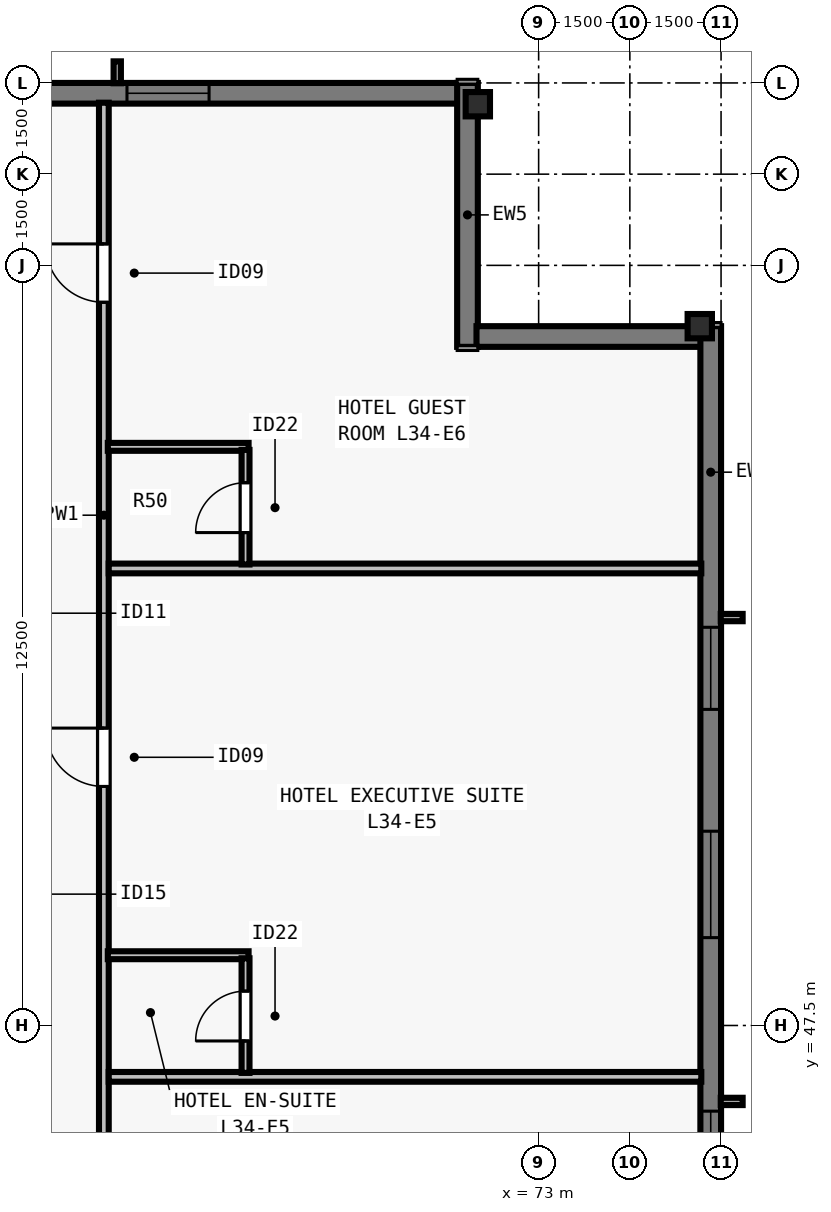
"""IFC4 building model, lengths in metres.
Left out: names, types, materials, properties, quantities, classifications, styles, units other than length and angle.
Written with IfcOpenShell. Run it as: python <this file> out.ifc"""

import sys

from ifc_helpers import new_model, si_unit, direction, frame, frame_2d, origin, origin_2d, place, context, subcontext, project, spatial, rectangle, i_section, extrude, element, fill, save


model = new_model("IFC4")
c1 = context("Model", 3, precision=1e-05, world=origin(), true_north=direction((0.0, 1.0)))
c2 = subcontext(c1, "Body", "Model", "MODEL_VIEW")
j1 = project(units=[si_unit("LENGTHUNIT", "METRE"), si_unit("PLANEANGLEUNIT", "RADIAN")], contexts=[c1])
p1 = place(None, origin())
s1 = spatial("IfcSite", under=j1, at=p1, CompositionType="ELEMENT")
p2 = place(p1, origin())
s2 = spatial("IfcBuilding", under=s1, at=p2, CompositionType="ELEMENT")
p3 = place(p2, frame((0.0, 0.0, 127.0)))
s3 = spatial("IfcBuildingStorey", under=s2, at=p3, CompositionType="ELEMENT", Elevation=127.0)
for number, where, z_axis, x_axis in (
    (1, (75.65, 59.0, 0.0), (0.0, 0.0, 1.0), (0.0, 1.0, 0.0)),
    (2, (72.0, 62.65, 0.0), (0.0, 0.0, 1.0), (1.0, 0.0, 0.0)),
):
    element("IfcColumn", number, at=place(p3, frame(where, z_axis=z_axis, x_axis=x_axis)), inside=s3, PredefinedType="COLUMN", context=c2, shape_type="SweptSolid", body=[
        extrude(i_section(OverallWidth=0.4, OverallDepth=0.4, WebThickness=0.022, FlangeThickness=0.036, at=origin_2d()), origin(), (0.0, 0.0, 1.0), 3.5),
    ])
p4 = place(p3, frame((32.0, 62.83, 0.0), z_axis=(0.0, 0.0, 1.0), x_axis=(1.0, 0.0, 0.0)))
e3 = element("IfcWall", 3, at=p4, inside=s3, PredefinedType="SOLIDWALL", context=c2, shape_type="SweptSolid", body=[
    extrude(rectangle(XDim=39.682, YDim=0.34, at=frame_2d((19.841, 0.0))), origin(), (0.0, 0.0, 1.0), 3.28),
])
p5 = place(p4, frame((4.952, 0.0, 0.8)))
e4 = element("IfcOpeningElement", 4, at=p5, cuts=e3, PredefinedType="OPENING", context=c2, shape_type="SweptSolid", body=[
    extrude(rectangle(XDim=1.35, YDim=1.66, at=frame_2d((0.675, 0.83))), frame((0.0, 0.18, 0.0), z_axis=(0.0, -1.0, 0.0), x_axis=(1.0, 0.0, 0.0)), (0.0, 0.0, 1.0), 0.36),
])
p6 = place(p4, frame((12.059, 0.0, 0.8)))
e5 = element("IfcOpeningElement", 5, at=p6, cuts=e3, PredefinedType="OPENING", context=c2, shape_type="SweptSolid", body=[
    extrude(rectangle(XDim=1.35, YDim=1.66, at=frame_2d((0.675, 0.83))), frame((0.0, 0.18, 0.0), z_axis=(0.0, -1.0, 0.0), x_axis=(1.0, 0.0, 0.0)), (0.0, 0.0, 1.0), 0.36),
])
p7 = place(p4, frame((16.262, 0.0, 0.8)))
e6 = element("IfcOpeningElement", 6, at=p7, cuts=e3, PredefinedType="OPENING", context=c2, shape_type="SweptSolid", body=[
    extrude(rectangle(XDim=1.75, YDim=1.66, at=frame_2d((0.875, 0.83))), frame((0.0, 0.18, 0.0), z_axis=(0.0, -1.0, 0.0), x_axis=(1.0, 0.0, 0.0)), (0.0, 0.0, 1.0), 0.36),
])
p8 = place(p4, frame((19.166, 0.0, 0.8)))
e7 = element("IfcOpeningElement", 7, at=p8, cuts=e3, PredefinedType="OPENING", context=c2, shape_type="SweptSolid", body=[
    extrude(rectangle(XDim=1.35, YDim=1.66, at=frame_2d((0.675, 0.83))), frame((0.0, 0.18, 0.0), z_axis=(0.0, -1.0, 0.0), x_axis=(1.0, 0.0, 0.0)), (0.0, 0.0, 1.0), 0.36),
])
p9 = place(p4, frame((22.07, 0.0, 0.8)))
e8 = element("IfcOpeningElement", 8, at=p9, cuts=e3, PredefinedType="OPENING", context=c2, shape_type="SweptSolid", body=[
    extrude(rectangle(XDim=1.75, YDim=1.66, at=frame_2d((0.875, 0.83))), frame((0.0, 0.18, 0.0), z_axis=(0.0, -1.0, 0.0), x_axis=(1.0, 0.0, 0.0)), (0.0, 0.0, 1.0), 0.36),
])
p10 = place(p4, frame((26.273, 0.0, 0.8)))
e9 = element("IfcOpeningElement", 9, at=p10, cuts=e3, PredefinedType="OPENING", context=c2, shape_type="SweptSolid", body=[
    extrude(rectangle(XDim=1.35, YDim=1.66, at=frame_2d((0.675, 0.83))), frame((0.0, 0.18, 0.0), z_axis=(0.0, -1.0, 0.0), x_axis=(1.0, 0.0, 0.0)), (0.0, 0.0, 1.0), 0.36),
])
p11 = place(p4, frame((29.627, 0.0, 0.8)))
e10 = element("IfcOpeningElement", 10, at=p11, cuts=e3, PredefinedType="OPENING", context=c2, shape_type="SweptSolid", body=[
    extrude(rectangle(XDim=1.75, YDim=1.66, at=frame_2d((0.875, 0.83))), frame((0.0, 0.18, 0.0), z_axis=(0.0, -1.0, 0.0), x_axis=(1.0, 0.0, 0.0)), (0.0, 0.0, 1.0), 0.36),
])
p12 = place(p4, frame((34.23, 0.0, 0.8)))
e11 = element("IfcOpeningElement", 11, at=p12, cuts=e3, PredefinedType="OPENING", context=c2, shape_type="SweptSolid", body=[
    extrude(rectangle(XDim=1.35, YDim=1.66, at=frame_2d((0.675, 0.83))), frame((0.0, 0.18, 0.0), z_axis=(0.0, -1.0, 0.0), x_axis=(1.0, 0.0, 0.0)), (0.0, 0.0, 1.0), 0.36),
])
p13 = place(p3, frame((71.83, 63.0, 0.0), z_axis=(0.0, 0.0, 1.0), x_axis=(0.0, -1.0, 0.0)))
e12 = element("IfcWall", 12, at=p13, inside=s3, PredefinedType="SOLIDWALL", context=c2, shape_type="SweptSolid", body=[
    extrude(rectangle(XDim=4.34, YDim=0.34, at=frame_2d((2.17, 0.0))), origin(), (0.0, 0.0, 1.0), 3.28),
])
p14 = place(p3, frame((71.978, 58.83, 0.0), z_axis=(0.0, 0.0, 1.0), x_axis=(1.0, 0.0, 0.0)))
e13 = element("IfcWall", 13, at=p14, inside=s3, PredefinedType="SOLIDWALL", context=c2, shape_type="SweptSolid", body=[
    extrude(rectangle(XDim=3.704, YDim=0.34, at=frame_2d((1.852, 0.0))), origin(), (0.0, 0.0, 1.0), 3.28),
])
p15 = place(p3, frame((75.83, 59.0, 0.0), z_axis=(0.0, 0.0, 1.0), x_axis=(0.0, -1.0, 0.0)))
e14 = element("IfcWall", 14, at=p15, inside=s3, PredefinedType="SOLIDWALL", context=c2, shape_type="SweptSolid", body=[
    extrude(rectangle(XDim=39.682, YDim=0.34, at=frame_2d((19.841, 0.0))), origin(), (0.0, 0.0, 1.0), 3.28),
])
p16 = place(p15, frame((4.952, 0.0, 0.8)))
e15 = element("IfcOpeningElement", 15, at=p16, cuts=e14, PredefinedType="OPENING", context=c2, shape_type="SweptSolid", body=[
    extrude(rectangle(XDim=1.35, YDim=1.66, at=frame_2d((0.675, 0.83))), frame((0.0, 0.18, 0.0), z_axis=(0.0, -1.0, 0.0), x_axis=(1.0, 0.0, 0.0)), (0.0, 0.0, 1.0), 0.36),
])
p17 = place(p15, frame((8.305, 0.0, 0.8)))
e16 = element("IfcOpeningElement", 16, at=p17, cuts=e14, PredefinedType="OPENING", context=c2, shape_type="SweptSolid", body=[
    extrude(rectangle(XDim=1.75, YDim=1.66, at=frame_2d((0.875, 0.83))), frame((0.0, 0.18, 0.0), z_axis=(0.0, -1.0, 0.0), x_axis=(1.0, 0.0, 0.0)), (0.0, 0.0, 1.0), 0.36),
])
p18 = place(p15, frame((12.909, 0.0, 0.8)))
e17 = element("IfcOpeningElement", 17, at=p18, cuts=e14, PredefinedType="OPENING", context=c2, shape_type="SweptSolid", body=[
    extrude(rectangle(XDim=1.35, YDim=1.66, at=frame_2d((0.675, 0.83))), frame((0.0, 0.18, 0.0), z_axis=(0.0, -1.0, 0.0), x_axis=(1.0, 0.0, 0.0)), (0.0, 0.0, 1.0), 0.36),
])
p19 = place(p15, frame((16.262, 0.0, 0.8)))
e18 = element("IfcOpeningElement", 18, at=p19, cuts=e14, PredefinedType="OPENING", context=c2, shape_type="SweptSolid", body=[
    extrude(rectangle(XDim=1.75, YDim=1.66, at=frame_2d((0.875, 0.83))), frame((0.0, 0.18, 0.0), z_axis=(0.0, -1.0, 0.0), x_axis=(1.0, 0.0, 0.0)), (0.0, 0.0, 1.0), 0.36),
])
p20 = place(p15, frame((20.016, 0.0, 0.8)))
e19 = element("IfcOpeningElement", 19, at=p20, cuts=e14, PredefinedType="OPENING", context=c2, shape_type="SweptSolid", body=[
    extrude(rectangle(XDim=1.35, YDim=1.66, at=frame_2d((0.675, 0.83))), frame((0.0, 0.18, 0.0), z_axis=(0.0, -1.0, 0.0), x_axis=(1.0, 0.0, 0.0)), (0.0, 0.0, 1.0), 0.36),
])
p21 = place(p15, frame((22.07, 0.0, 0.8)))
e20 = element("IfcOpeningElement", 20, at=p21, cuts=e14, PredefinedType="OPENING", context=c2, shape_type="SweptSolid", body=[
    extrude(rectangle(XDim=1.75, YDim=1.66, at=frame_2d((0.875, 0.83))), frame((0.0, 0.18, 0.0), z_axis=(0.0, -1.0, 0.0), x_axis=(1.0, 0.0, 0.0)), (0.0, 0.0, 1.0), 0.36),
])
p22 = place(p15, frame((26.273, 0.0, 0.8)))
e21 = element("IfcOpeningElement", 21, at=p22, cuts=e14, PredefinedType="OPENING", context=c2, shape_type="SweptSolid", body=[
    extrude(rectangle(XDim=1.35, YDim=1.66, at=frame_2d((0.675, 0.83))), frame((0.0, 0.18, 0.0), z_axis=(0.0, -1.0, 0.0), x_axis=(1.0, 0.0, 0.0)), (0.0, 0.0, 1.0), 0.36),
])
p23 = place(p15, frame((29.627, 0.0, 0.8)))
e22 = element("IfcOpeningElement", 22, at=p23, cuts=e14, PredefinedType="OPENING", context=c2, shape_type="SweptSolid", body=[
    extrude(rectangle(XDim=1.75, YDim=1.66, at=frame_2d((0.875, 0.83))), frame((0.0, 0.18, 0.0), z_axis=(0.0, -1.0, 0.0), x_axis=(1.0, 0.0, 0.0)), (0.0, 0.0, 1.0), 0.36),
])
p24 = place(p15, frame((33.38, 0.0, 0.8)))
e23 = element("IfcOpeningElement", 23, at=p24, cuts=e14, PredefinedType="OPENING", context=c2, shape_type="SweptSolid", body=[
    extrude(rectangle(XDim=1.35, YDim=1.66, at=frame_2d((0.675, 0.83))), frame((0.0, 0.18, 0.0), z_axis=(0.0, -1.0, 0.0), x_axis=(1.0, 0.0, 0.0)), (0.0, 0.0, 1.0), 0.36),
])
p25 = place(p15, frame((35.83, 0.0, 0.8)))
e24 = element("IfcOpeningElement", 24, at=p25, cuts=e14, PredefinedType="OPENING", context=c2, shape_type="SweptSolid", body=[
    extrude(rectangle(XDim=0.9, YDim=1.66, at=frame_2d((0.45, 0.83))), frame((0.0, 0.18, 0.0), z_axis=(0.0, -1.0, 0.0), x_axis=(1.0, 0.0, 0.0)), (0.0, 0.0, 1.0), 0.36),
])
p26 = place(p3, frame((65.85, 15.325, 0.0), z_axis=(0.0, 0.0, 1.0), x_axis=(0.0, 1.0, 0.0)))
e25 = element("IfcWall", 25, at=p26, inside=s3, PredefinedType="PARTITIONING", context=c2, shape_type="SweptSolid", body=[
    extrude(rectangle(XDim=47.35, YDim=0.16, at=frame_2d((23.675, 0.0))), origin(), (0.0, 0.0, 1.0), 2.555),
])
p27 = place(p26, frame((4.993, 0.0, 0.0)))
e26 = element("IfcOpeningElement", 26, at=p27, cuts=e25, PredefinedType="OPENING", context=c2, shape_type="SweptSolid", body=[
    extrude(rectangle(XDim=0.96, YDim=2.15, at=frame_2d((0.48, 1.075))), frame((0.0, 0.09, 0.0), z_axis=(0.0, -1.0, 0.0), x_axis=(1.0, 0.0, 0.0)), (0.0, 0.0, 1.0), 0.18),
])
p28 = place(p26, frame((12.525, 0.0, 0.0)))
e27 = element("IfcOpeningElement", 27, at=p28, cuts=e25, PredefinedType="OPENING", context=c2, shape_type="SweptSolid", body=[
    extrude(rectangle(XDim=0.96, YDim=2.15, at=frame_2d((0.48, 1.075))), frame((0.0, 0.09, 0.0), z_axis=(0.0, -1.0, 0.0), x_axis=(1.0, 0.0, 0.0)), (0.0, 0.0, 1.0), 0.18),
])
p29 = place(p26, frame((20.385, 0.0, 0.0)))
e28 = element("IfcOpeningElement", 28, at=p29, cuts=e25, PredefinedType="OPENING", context=c2, shape_type="SweptSolid", body=[
    extrude(rectangle(XDim=0.96, YDim=2.15, at=frame_2d((0.48, 1.075))), frame((0.0, 0.09, 0.0), z_axis=(0.0, -1.0, 0.0), x_axis=(1.0, 0.0, 0.0)), (0.0, 0.0, 1.0), 0.18),
])
p30 = place(p26, frame((28.246, 0.0, 0.0)))
e29 = element("IfcOpeningElement", 29, at=p30, cuts=e25, PredefinedType="OPENING", context=c2, shape_type="SweptSolid", body=[
    extrude(rectangle(XDim=0.96, YDim=2.15, at=frame_2d((0.48, 1.075))), frame((0.0, 0.09, 0.0), z_axis=(0.0, -1.0, 0.0), x_axis=(1.0, 0.0, 0.0)), (0.0, 0.0, 1.0), 0.18),
])
p31 = place(p26, frame((36.105, 0.0, 0.0)))
e30 = element("IfcOpeningElement", 30, at=p31, cuts=e25, PredefinedType="OPENING", context=c2, shape_type="SweptSolid", body=[
    extrude(rectangle(XDim=0.96, YDim=2.15, at=frame_2d((0.48, 1.075))), frame((0.0, 0.09, 0.0), z_axis=(0.0, -1.0, 0.0), x_axis=(1.0, 0.0, 0.0)), (0.0, 0.0, 1.0), 0.18),
])
p32 = place(p26, frame((44.068, 0.0, 0.0)))
e31 = element("IfcOpeningElement", 31, at=p32, cuts=e25, PredefinedType="OPENING", context=c2, shape_type="SweptSolid", body=[
    extrude(rectangle(XDim=0.96, YDim=2.15, at=frame_2d((0.48, 1.075))), frame((0.0, 0.09, 0.0), z_axis=(0.0, -1.0, 0.0), x_axis=(1.0, 0.0, 0.0)), (0.0, 0.0, 1.0), 0.18),
])
p33 = place(p3, frame((65.93, 46.655, 0.0), z_axis=(0.0, 0.0, 1.0), x_axis=(1.0, 0.0, 0.0)))
e32 = element("IfcWall", 32, at=p33, inside=s3, PredefinedType="PARTITIONING", context=c2, shape_type="SweptSolid", body=[
    extrude(rectangle(XDim=9.745, YDim=0.16, at=frame_2d((4.873, 0.0))), origin(), (0.0, 0.0, 1.0), 3.28),
])
p34 = place(p3, frame((65.915, 48.655, 0.0), z_axis=(0.0, 0.0, 1.0), x_axis=(1.0, 0.0, 0.0)))
e33 = element("IfcWall", 33, at=p34, inside=s3, PredefinedType="PLUMBINGWALL", context=c2, shape_type="SweptSolid", body=[
    extrude(rectangle(XDim=2.315, YDim=0.13, at=frame_2d((1.157, 0.0))), origin(), (0.0, 0.0, 1.0), 3.28),
])
p35 = place(p3, frame((68.18, 46.72, 0.0), z_axis=(0.0, 0.0, 1.0), x_axis=(0.0, 1.0, 0.0)))
e34 = element("IfcWall", 34, at=p35, inside=s3, PredefinedType="PLUMBINGWALL", context=c2, shape_type="SweptSolid", body=[
    extrude(rectangle(XDim=1.885, YDim=0.13, at=frame_2d((0.942, 0.0))), origin(), (0.0, 0.0, 1.0), 3.28),
])
p36 = place(p35, frame((0.525, 0.0, 0.0)))
e35 = element("IfcOpeningElement", 35, at=p36, cuts=e34, PredefinedType="OPENING", context=c2, shape_type="SweptSolid", body=[
    extrude(rectangle(XDim=0.82, YDim=2.1, at=frame_2d((0.41, 1.05))), frame((0.0, 0.075, 0.0), z_axis=(0.0, -1.0, 0.0), x_axis=(1.0, 0.0, 0.0)), (0.0, 0.0, 1.0), 0.15),
])
p37 = place(p3, frame((65.93, 55.016, 0.0), z_axis=(0.0, 0.0, 1.0), x_axis=(1.0, 0.0, 0.0)))
e36 = element("IfcWall", 36, at=p37, inside=s3, PredefinedType="PARTITIONING", context=c2, shape_type="SweptSolid", body=[
    extrude(rectangle(XDim=9.745, YDim=0.16, at=frame_2d((4.873, 0.0))), origin(), (0.0, 0.0, 1.0), 2.896),
])
p38 = place(p3, frame((65.915, 57.016, 0.0), z_axis=(0.0, 0.0, 1.0), x_axis=(1.0, 0.0, 0.0)))
e37 = element("IfcWall", 37, at=p38, inside=s3, PredefinedType="PLUMBINGWALL", context=c2, shape_type="SweptSolid", body=[
    extrude(rectangle(XDim=2.315, YDim=0.13, at=frame_2d((1.157, 0.0))), origin(), (0.0, 0.0, 1.0), 3.28),
])
p39 = place(p3, frame((68.18, 55.081, 0.0), z_axis=(0.0, 0.0, 1.0), x_axis=(0.0, 1.0, 0.0)))
e38 = element("IfcWall", 38, at=p39, inside=s3, PredefinedType="PLUMBINGWALL", context=c2, shape_type="SweptSolid", body=[
    extrude(rectangle(XDim=1.885, YDim=0.13, at=frame_2d((0.942, 0.0))), origin(), (0.0, 0.0, 1.0), 3.28),
])
p40 = place(p39, frame((0.525, 0.0, 0.0)))
e39 = element("IfcOpeningElement", 39, at=p40, cuts=e38, PredefinedType="OPENING", context=c2, shape_type="SweptSolid", body=[
    extrude(rectangle(XDim=0.82, YDim=2.1, at=frame_2d((0.41, 1.05))), frame((0.0, 0.075, 0.0), z_axis=(0.0, -1.0, 0.0), x_axis=(1.0, 0.0, 0.0)), (0.0, 0.0, 1.0), 0.15),
])
p41 = place(p12, origin())
e40 = element("IfcWindow", 40, at=p41, inside=s3, PartitioningType="SINGLE_PANEL", PredefinedType="WINDOW", context=c2, shape_type="SweptSolid", body=[
    extrude(rectangle(XDim=1.35, YDim=1.66, at=frame_2d((0.675, 0.83))), frame((0.0, -0.05, 0.0), z_axis=(0.0, -1.0, 0.0), x_axis=(1.0, 0.0, 0.0)), (0.0, 0.0, 1.0), 0.06),
])
fill(e11, e40)
p42 = place(p16, origin())
e41 = element("IfcWindow", 41, at=p42, inside=s3, PartitioningType="SINGLE_PANEL", PredefinedType="WINDOW", context=c2, shape_type="SweptSolid", body=[
    extrude(rectangle(XDim=1.35, YDim=1.66, at=frame_2d((0.675, 0.83))), frame((0.0, -0.05, 0.0), z_axis=(0.0, -1.0, 0.0), x_axis=(1.0, 0.0, 0.0)), (0.0, 0.0, 1.0), 0.06),
])
fill(e15, e41)
p43 = place(p17, origin())
e42 = element("IfcWindow", 42, at=p43, inside=s3, PartitioningType="SINGLE_PANEL", PredefinedType="WINDOW", context=c2, shape_type="SweptSolid", body=[
    extrude(rectangle(XDim=1.75, YDim=1.66, at=frame_2d((0.875, 0.83))), frame((0.0, -0.05, 0.0), z_axis=(0.0, -1.0, 0.0), x_axis=(1.0, 0.0, 0.0)), (0.0, 0.0, 1.0), 0.06),
])
fill(e16, e42)
p44 = place(p18, origin())
e43 = element("IfcWindow", 43, at=p44, inside=s3, PartitioningType="SINGLE_PANEL", PredefinedType="WINDOW", context=c2, shape_type="SweptSolid", body=[
    extrude(rectangle(XDim=1.35, YDim=1.66, at=frame_2d((0.675, 0.83))), frame((0.0, -0.05, 0.0), z_axis=(0.0, -1.0, 0.0), x_axis=(1.0, 0.0, 0.0)), (0.0, 0.0, 1.0), 0.06),
])
fill(e17, e43)
p45 = place(p36, origin())
e44 = element("IfcDoor", 44, at=p45, inside=s3, OperationType="SINGLE_SWING_LEFT", PredefinedType="DOOR", context=c2, shape_type="SweptSolid", body=[
    extrude(rectangle(XDim=0.82, YDim=2.1, at=frame_2d((0.41, 1.05))), frame((0.0, 0.025, 0.0), z_axis=(0.0, -1.0, 0.0), x_axis=(1.0, 0.0, 0.0)), (0.0, 0.0, 1.0), 0.05),
])
fill(e35, e44)
p46 = place(p31, origin())
e45 = element("IfcDoor", 45, at=p46, inside=s3, OperationType="SINGLE_SWING_RIGHT", PredefinedType="DOOR", context=c2, shape_type="SweptSolid", body=[
    extrude(rectangle(XDim=0.96, YDim=2.15, at=frame_2d((0.48, 1.075))), frame((0.0, 0.025, 0.0), z_axis=(0.0, -1.0, 0.0), x_axis=(1.0, 0.0, 0.0)), (0.0, 0.0, 1.0), 0.05),
])
fill(e30, e45)
p47 = place(p40, origin())
e46 = element("IfcDoor", 46, at=p47, inside=s3, OperationType="SINGLE_SWING_LEFT", PredefinedType="DOOR", context=c2, shape_type="SweptSolid", body=[
    extrude(rectangle(XDim=0.82, YDim=2.1, at=frame_2d((0.41, 1.05))), frame((0.0, 0.025, 0.0), z_axis=(0.0, -1.0, 0.0), x_axis=(1.0, 0.0, 0.0)), (0.0, 0.0, 1.0), 0.05),
])
fill(e39, e46)
p48 = place(p32, origin())
e47 = element("IfcDoor", 47, at=p48, inside=s3, OperationType="SINGLE_SWING_RIGHT", PredefinedType="DOOR", context=c2, shape_type="SweptSolid", body=[
    extrude(rectangle(XDim=0.96, YDim=2.15, at=frame_2d((0.48, 1.075))), frame((0.0, 0.025, 0.0), z_axis=(0.0, -1.0, 0.0), x_axis=(1.0, 0.0, 0.0)), (0.0, 0.0, 1.0), 0.05),
])
fill(e31, e47)
save(model, sys.argv[1])
